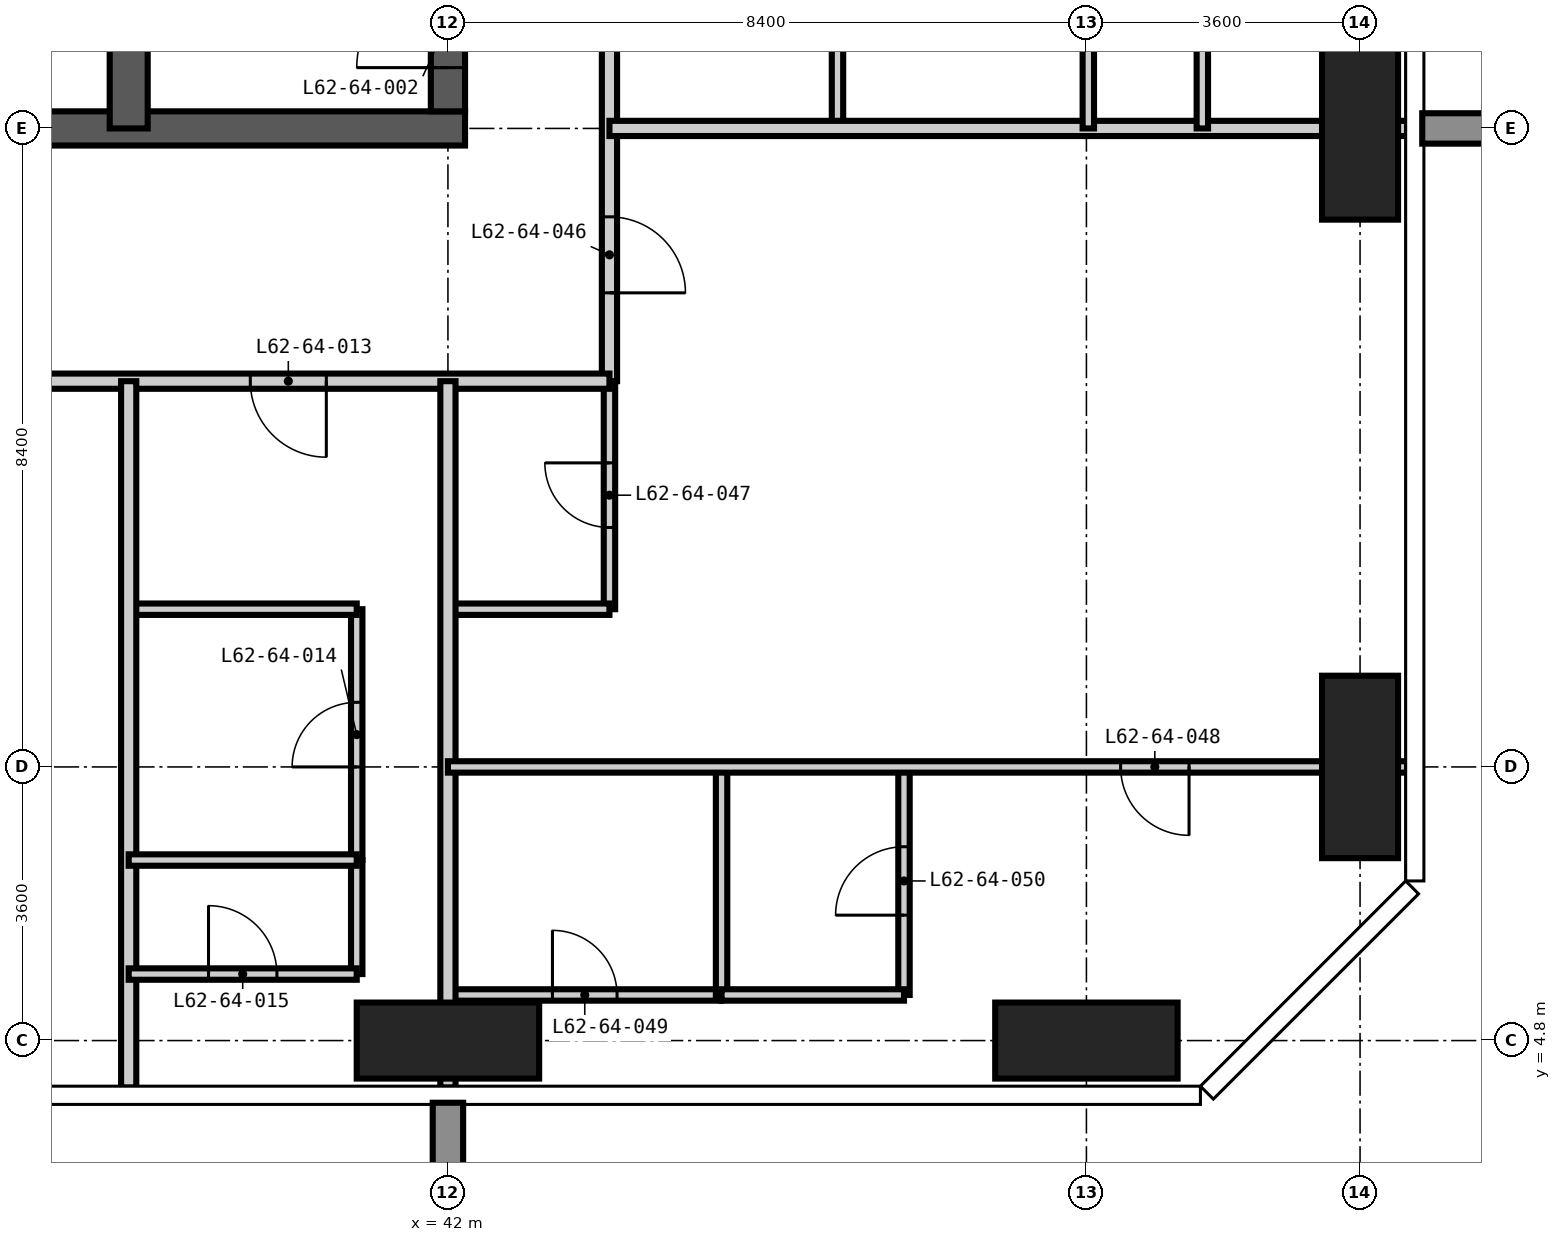
"""IFC4 building model, lengths in metres.
Left out: names, types, materials, properties, quantities, classifications, styles, units other than length and angle.
Written with IfcOpenShell. Run it as: python <this file> out.ifc"""

import sys

from ifc_helpers import new_model, si_unit, direction, frame, frame_2d, origin, origin_2d, place, context, subcontext, project, spatial, rectangle, extrude, element, fill, save


model = new_model("IFC4")
c1 = context("Model", 3, precision=1e-05, world=origin(), true_north=direction((0.0, 1.0)))
c2 = subcontext(c1, "Body", "Model", "MODEL_VIEW")
j1 = project(units=[si_unit("LENGTHUNIT", "METRE"), si_unit("PLANEANGLEUNIT", "RADIAN")], contexts=[c1])
p1 = place(None, origin())
s1 = spatial("IfcSite", under=j1, at=p1, CompositionType="ELEMENT")
p2 = place(p1, origin())
s2 = spatial("IfcBuilding", under=s1, at=p2, CompositionType="ELEMENT")
p3 = place(p2, frame((0.0, 0.0, 241.2)))
s3 = spatial("IfcBuildingStorey", under=s2, at=p3, CompositionType="ELEMENT", Elevation=241.2)
for number, where, z_axis, x_axis in (
    (1, (42.0, 4.8, -0.35), (0.0, 0.0, 1.0), (1.0, 0.0, 0.0)),
    (2, (50.4, 4.8, -0.35), (0.0, 0.0, 1.0), (1.0, 0.0, 0.0)),
):
    element("IfcColumn", number, at=place(p3, frame(where, z_axis=z_axis, x_axis=x_axis)), inside=s3, PredefinedType="COLUMN", context=c2, shape_type="SweptSolid", body=[
        extrude(rectangle(XDim=2.4, YDim=1.0, at=origin_2d()), origin(), (0.0, 0.0, 1.0), 3.9),
    ])
for number, where, z_axis, x_axis in (
    (3, (54.0, 8.4, -0.35), (0.0, 0.0, 1.0), (1.0, 0.0, 0.0)),
    (4, (54.0, 16.8, -0.35), (0.0, 0.0, 1.0), (1.0, 0.0, 0.0)),
):
    element("IfcColumn", number, at=place(p3, frame(where, z_axis=z_axis, x_axis=x_axis)), inside=s3, PredefinedType="COLUMN", context=c2, shape_type="SweptSolid", body=[
        extrude(rectangle(XDim=1.0, YDim=2.4, at=origin_2d()), origin(), (0.0, 0.0, 1.0), 3.9),
    ])
p4 = place(p3, frame((24.975, 16.8, -0.35), z_axis=(0.0, 0.0, 1.0), x_axis=(1.0, 0.0, 0.0)))
e5 = element("IfcWall", 5, at=p4, inside=s3, PredefinedType="SHEAR", context=c2, shape_type="SweptSolid", body=[
    extrude(rectangle(XDim=17.25, YDim=0.45, at=frame_2d((8.625, 0.0))), origin(), (0.0, 0.0, 1.0), 3.9),
])
p5 = place(p4, frame((3.925, 0.0, 0.35)))
e6 = element("IfcOpeningElement", 6, at=p5, cuts=e5, PredefinedType="OPENING", context=c2, shape_type="SweptSolid", body=[
    extrude(rectangle(XDim=1.0, YDim=2.1, at=frame_2d((0.5, 1.05))), frame((0.0, 0.235, 0.0), z_axis=(0.0, -1.0, 0.0), x_axis=(1.0, 0.0, 0.0)), (0.0, 0.0, 1.0), 0.47),
])
p6 = place(p4, frame((10.225, 0.0, 0.35)))
e7 = element("IfcOpeningElement", 7, at=p6, cuts=e5, PredefinedType="OPENING", context=c2, shape_type="SweptSolid", body=[
    extrude(rectangle(XDim=1.0, YDim=2.1, at=frame_2d((0.5, 1.05))), frame((0.0, 0.235, 0.0), z_axis=(0.0, -1.0, 0.0), x_axis=(1.0, 0.0, 0.0)), (0.0, 0.0, 1.0), 0.47),
])
p7 = place(p3, frame((42.0, 17.025, -0.35), z_axis=(0.0, 0.0, 1.0), x_axis=(0.0, 1.0, 0.0)))
e8 = element("IfcWall", 8, at=p7, inside=s3, PredefinedType="SHEAR", context=c2, shape_type="SweptSolid", body=[
    extrude(rectangle(XDim=24.75, YDim=0.45, at=frame_2d((12.375, 0.0))), origin(), (0.0, 0.0, 1.0), 3.9),
])
p8 = place(p7, frame((0.575, 0.0, 0.35)))
e9 = element("IfcOpeningElement", 9, at=p8, cuts=e8, PredefinedType="OPENING", context=c2, shape_type="SweptSolid", body=[
    extrude(rectangle(XDim=1.2, YDim=2.2, at=frame_2d((0.6, 1.1))), frame((0.0, 0.235, 0.0), z_axis=(0.0, -1.0, 0.0), x_axis=(1.0, 0.0, 0.0)), (0.0, 0.0, 1.0), 0.47),
])
p9 = place(p7, frame((11.475, 0.0, 0.35)))
e10 = element("IfcOpeningElement", 10, at=p9, cuts=e8, PredefinedType="OPENING", context=c2, shape_type="SweptSolid", body=[
    extrude(rectangle(XDim=1.8, YDim=2.2, at=frame_2d((0.9, 1.1))), frame((0.0, 0.235, 0.0), z_axis=(0.0, -1.0, 0.0), x_axis=(1.0, 0.0, 0.0)), (0.0, 0.0, 1.0), 0.47),
])
p10 = place(p7, frame((20.275, 0.0, 0.35)))
e11 = element("IfcOpeningElement", 11, at=p10, cuts=e8, PredefinedType="OPENING", context=c2, shape_type="SweptSolid", body=[
    extrude(rectangle(XDim=1.0, YDim=2.1, at=frame_2d((0.5, 1.05))), frame((0.0, 0.235, 0.0), z_axis=(0.0, -1.0, 0.0), x_axis=(1.0, 0.0, 0.0)), (0.0, 0.0, 1.0), 0.47),
])
p11 = place(p3, frame((37.8, 16.8, -0.35), z_axis=(0.0, 0.0, 1.0), x_axis=(0.0, 1.0, 0.0)))
e12 = element("IfcWall", 12, at=p11, inside=s3, PredefinedType="SHEAR", context=c2, shape_type="SweptSolid", body=[
    extrude(rectangle(XDim=11.2, YDim=0.5, at=frame_2d((5.6, 0.0))), origin(), (0.0, 0.0, 1.0), 3.9),
])
p12 = place(p3, frame((40.8, 7.175, 0.0), z_axis=(0.0, 0.0, 1.0), x_axis=(0.0, 1.0, 0.0)))
e13 = element("IfcWall", 13, at=p12, inside=s3, PredefinedType="PARTITIONING", context=c2, shape_type="SweptSolid", body=[
    extrude(rectangle(XDim=3.3, YDim=0.15, at=frame_2d((1.65, 0.0))), origin(), (0.0, 0.0, 1.0), 3.55),
])
p13 = place(p12, frame((1.225, 0.0, 0.0)))
e14 = element("IfcOpeningElement", 14, at=p13, cuts=e13, PredefinedType="OPENING", context=c2, shape_type="SweptSolid", body=[
    extrude(rectangle(XDim=0.85, YDim=2.1, at=frame_2d((0.425, 1.05))), frame((0.0, 0.085, 0.0), z_axis=(0.0, -1.0, 0.0), x_axis=(1.0, 0.0, 0.0)), (0.0, 0.0, 1.0), 0.17),
])
p14 = place(p3, frame((44.125, 10.475, 0.0), z_axis=(0.0, 0.0, 1.0), x_axis=(0.0, 1.0, 0.0)))
e15 = element("IfcWall", 15, at=p14, inside=s3, PredefinedType="PARTITIONING", context=c2, shape_type="SweptSolid", body=[
    extrude(rectangle(XDim=3.0, YDim=0.15, at=frame_2d((1.5, 0.0))), origin(), (0.0, 0.0, 1.0), 3.55),
])
p15 = place(p14, frame((1.075, 0.0, 0.0)))
e16 = element("IfcOpeningElement", 16, at=p15, cuts=e15, PredefinedType="OPENING", context=c2, shape_type="SweptSolid", body=[
    extrude(rectangle(XDim=0.85, YDim=2.1, at=frame_2d((0.425, 1.05))), frame((0.0, 0.085, 0.0), z_axis=(0.0, -1.0, 0.0), x_axis=(1.0, 0.0, 0.0)), (0.0, 0.0, 1.0), 0.17),
])
p16 = place(p3, frame((47.125, 16.8, 0.0), z_axis=(0.0, 0.0, 1.0), x_axis=(0.0, 1.0, 0.0)))
e17 = element("IfcWall", 17, at=p16, inside=s3, PredefinedType="PARTITIONING", context=c2, shape_type="SweptSolid", body=[
    extrude(rectangle(XDim=3.0, YDim=0.15, at=frame_2d((1.5, 0.0))), origin(), (0.0, 0.0, 1.0), 3.55),
])
p17 = place(p3, frame((42.0, 5.4, 0.0), z_axis=(0.0, 0.0, 1.0), x_axis=(1.0, 0.0, 0.0)))
e18 = element("IfcWall", 18, at=p17, inside=s3, PredefinedType="PARTITIONING", context=c2, shape_type="SweptSolid", body=[
    extrude(rectangle(XDim=3.6, YDim=0.15, at=frame_2d((1.8, 0.0))), origin(), (0.0, 0.0, 1.0), 3.55),
])
p18 = place(p17, frame((1.375, 0.0, 0.0)))
e19 = element("IfcOpeningElement", 19, at=p18, cuts=e18, PredefinedType="OPENING", context=c2, shape_type="SweptSolid", body=[
    extrude(rectangle(XDim=0.85, YDim=2.1, at=frame_2d((0.425, 1.05))), frame((0.0, 0.085, 0.0), z_axis=(0.0, -1.0, 0.0), x_axis=(1.0, 0.0, 0.0)), (0.0, 0.0, 1.0), 0.17),
])
p19 = place(p3, frame((37.8, 10.475, 0.0), z_axis=(0.0, 0.0, 1.0), x_axis=(1.0, 0.0, 0.0)))
e20 = element("IfcWall", 20, at=p19, inside=s3, PredefinedType="PARTITIONING", context=c2, shape_type="SweptSolid", body=[
    extrude(rectangle(XDim=3.0, YDim=0.15, at=frame_2d((1.5, 0.0))), origin(), (0.0, 0.0, 1.0), 3.55),
])
p20 = place(p3, frame((42.0, 10.475, 0.0), z_axis=(0.0, 0.0, 1.0), x_axis=(1.0, 0.0, 0.0)))
e21 = element("IfcWall", 21, at=p20, inside=s3, PredefinedType="PARTITIONING", context=c2, shape_type="SweptSolid", body=[
    extrude(rectangle(XDim=2.125, YDim=0.15, at=frame_2d((1.062, 0.0))), origin(), (0.0, 0.0, 1.0), 3.55),
])
p21 = place(p3, frame((44.125, 25.2, 0.0), z_axis=(0.0, 0.0, 1.0), x_axis=(0.0, -1.0, 0.0)))
e22 = element("IfcWall", 22, at=p21, inside=s3, PredefinedType="PARTITIONING", context=c2, shape_type="SweptSolid", body=[
    extrude(rectangle(XDim=11.725, YDim=0.2, at=frame_2d((5.862, 0.0))), origin(), (0.0, 0.0, 1.0), 3.55),
])
p22 = place(p21, frame((3.7, 0.0, 0.0)))
e23 = element("IfcOpeningElement", 23, at=p22, cuts=e22, PredefinedType="OPENING", context=c2, shape_type="SweptSolid", body=[
    extrude(rectangle(XDim=1.0, YDim=2.2, at=frame_2d((0.5, 1.1))), frame((0.0, 0.11, 0.0), z_axis=(0.0, -1.0, 0.0), x_axis=(1.0, 0.0, 0.0)), (0.0, 0.0, 1.0), 0.22),
])
p23 = place(p21, frame((9.563, 0.0, 0.0)))
e24 = element("IfcOpeningElement", 24, at=p23, cuts=e22, PredefinedType="OPENING", context=c2, shape_type="SweptSolid", body=[
    extrude(rectangle(XDim=1.0, YDim=2.2, at=frame_2d((0.5, 1.1))), frame((0.0, 0.11, 0.0), z_axis=(0.0, -1.0, 0.0), x_axis=(1.0, 0.0, 0.0)), (0.0, 0.0, 1.0), 0.22),
])
p24 = place(p3, frame((44.125, 13.475, 0.0), z_axis=(0.0, 0.0, 1.0), x_axis=(-1.0, 0.0, 0.0)))
e25 = element("IfcWall", 25, at=p24, inside=s3, PredefinedType="PARTITIONING", context=c2, shape_type="SweptSolid", body=[
    extrude(rectangle(XDim=22.25, YDim=0.2, at=frame_2d((11.125, 0.0))), origin(), (0.0, 0.0, 1.0), 3.55),
])
p25 = place(p24, frame((16.325, 0.0, 0.0)))
e26 = element("IfcOpeningElement", 26, at=p25, cuts=e25, PredefinedType="OPENING", context=c2, shape_type="SweptSolid", body=[
    extrude(rectangle(XDim=1.0, YDim=2.2, at=frame_2d((0.5, 1.1))), frame((0.0, 0.11, 0.0), z_axis=(0.0, -1.0, 0.0), x_axis=(1.0, 0.0, 0.0)), (0.0, 0.0, 1.0), 0.22),
])
p26 = place(p24, frame((10.025, 0.0, 0.0)))
e27 = element("IfcOpeningElement", 27, at=p26, cuts=e25, PredefinedType="OPENING", context=c2, shape_type="SweptSolid", body=[
    extrude(rectangle(XDim=1.0, YDim=2.2, at=frame_2d((0.5, 1.1))), frame((0.0, 0.11, 0.0), z_axis=(0.0, -1.0, 0.0), x_axis=(1.0, 0.0, 0.0)), (0.0, 0.0, 1.0), 0.22),
])
p27 = place(p24, frame((3.725, 0.0, 0.0)))
e28 = element("IfcOpeningElement", 28, at=p27, cuts=e25, PredefinedType="OPENING", context=c2, shape_type="SweptSolid", body=[
    extrude(rectangle(XDim=1.0, YDim=2.2, at=frame_2d((0.5, 1.1))), frame((0.0, 0.11, 0.0), z_axis=(0.0, -1.0, 0.0), x_axis=(1.0, 0.0, 0.0)), (0.0, 0.0, 1.0), 0.22),
])
for number, where, z_axis, x_axis in (
    (29, (37.8, 4.182, 0.0), (0.0, 0.0, 1.0), (0.0, 1.0, 0.0)),
    (30, (42.0, 4.182, 0.0), (0.0, 0.0, 1.0), (0.0, 1.0, 0.0)),
):
    element("IfcWall", number, at=place(p3, frame(where, z_axis=z_axis, x_axis=x_axis)), inside=s3, PredefinedType="PARTITIONING", context=c2, shape_type="SweptSolid", body=[
        extrude(rectangle(XDim=9.293, YDim=0.2, at=frame_2d((4.646, 0.0))), origin(), (0.0, 0.0, 1.0), 3.55),
    ])
p28 = place(p3, frame((44.125, 16.8, 0.0), z_axis=(0.0, 0.0, 1.0), x_axis=(1.0, 0.0, 0.0)))
e31 = element("IfcWall", 31, at=p28, inside=s3, PredefinedType="PARTITIONING", context=c2, shape_type="SweptSolid", body=[
    extrude(rectangle(XDim=10.493, YDim=0.2, at=frame_2d((5.247, 0.0))), origin(), (0.0, 0.0, 1.0), 3.55),
])
p29 = place(p3, frame((40.8, 5.675, 0.0), z_axis=(0.0, 0.0, 1.0), x_axis=(0.0, 1.0, 0.0)))
e32 = element("IfcWall", 32, at=p29, inside=s3, PredefinedType="PARTITIONING", context=c2, shape_type="SweptSolid", body=[
    extrude(rectangle(XDim=1.5, YDim=0.15, at=frame_2d((0.75, 0.0))), origin(), (0.0, 0.0, 1.0), 3.55),
])
p30 = place(p3, frame((45.6, 5.4, 0.0), z_axis=(0.0, 0.0, 1.0), x_axis=(0.0, 1.0, 0.0)))
e33 = element("IfcWall", 33, at=p30, inside=s3, PredefinedType="PARTITIONING", context=c2, shape_type="SweptSolid", body=[
    extrude(rectangle(XDim=3.0, YDim=0.15, at=frame_2d((1.5, 0.0))), origin(), (0.0, 0.0, 1.0), 3.55),
])
p31 = place(p3, frame((48.0, 5.4, 0.0), z_axis=(0.0, 0.0, 1.0), x_axis=(0.0, 1.0, 0.0)))
e34 = element("IfcWall", 34, at=p31, inside=s3, PredefinedType="PARTITIONING", context=c2, shape_type="SweptSolid", body=[
    extrude(rectangle(XDim=3.0, YDim=0.15, at=frame_2d((1.5, 0.0))), origin(), (0.0, 0.0, 1.0), 3.55),
])
p32 = place(p31, frame((1.05, 0.0, 0.0)))
e35 = element("IfcOpeningElement", 35, at=p32, cuts=e34, PredefinedType="OPENING", context=c2, shape_type="SweptSolid", body=[
    extrude(rectangle(XDim=0.9, YDim=2.1, at=frame_2d((0.45, 1.05))), frame((0.0, 0.085, 0.0), z_axis=(0.0, -1.0, 0.0), x_axis=(1.0, 0.0, 0.0)), (0.0, 0.0, 1.0), 0.17),
])
p33 = place(p3, frame((50.425, 16.8, 0.0), z_axis=(0.0, 0.0, 1.0), x_axis=(0.0, 1.0, 0.0)))
e36 = element("IfcWall", 36, at=p33, inside=s3, PredefinedType="PARTITIONING", context=c2, shape_type="SweptSolid", body=[
    extrude(rectangle(XDim=3.0, YDim=0.15, at=frame_2d((1.5, 0.0))), origin(), (0.0, 0.0, 1.0), 3.55),
])
p34 = place(p3, frame((51.925, 16.8, 0.0), z_axis=(0.0, 0.0, 1.0), x_axis=(0.0, 1.0, 0.0)))
e37 = element("IfcWall", 37, at=p34, inside=s3, PredefinedType="PARTITIONING", context=c2, shape_type="SweptSolid", body=[
    extrude(rectangle(XDim=3.0, YDim=0.15, at=frame_2d((1.5, 0.0))), origin(), (0.0, 0.0, 1.0), 3.55),
])
p35 = place(p34, frame((1.25, 0.0, 0.0)))
e38 = element("IfcOpeningElement", 38, at=p35, cuts=e37, PredefinedType="OPENING", context=c2, shape_type="SweptSolid", body=[
    extrude(rectangle(XDim=0.9, YDim=2.1, at=frame_2d((0.45, 1.05))), frame((0.0, 0.085, 0.0), z_axis=(0.0, -1.0, 0.0), x_axis=(1.0, 0.0, 0.0)), (0.0, 0.0, 1.0), 0.17),
])
p36 = place(p3, frame((45.6, 5.4, 0.0), z_axis=(0.0, 0.0, 1.0), x_axis=(1.0, 0.0, 0.0)))
e39 = element("IfcWall", 39, at=p36, inside=s3, PredefinedType="PARTITIONING", context=c2, shape_type="SweptSolid", body=[
    extrude(rectangle(XDim=2.4, YDim=0.15, at=frame_2d((1.2, 0.0))), origin(), (0.0, 0.0, 1.0), 3.55),
])
p37 = place(p3, frame((37.8, 5.675, 0.0), z_axis=(0.0, 0.0, 1.0), x_axis=(1.0, 0.0, 0.0)))
e40 = element("IfcWall", 40, at=p37, inside=s3, PredefinedType="PARTITIONING", context=c2, shape_type="SweptSolid", body=[
    extrude(rectangle(XDim=3.0, YDim=0.15, at=frame_2d((1.5, 0.0))), origin(), (0.0, 0.0, 1.0), 3.55),
])
p38 = place(p37, frame((1.05, 0.0, 0.0)))
e41 = element("IfcOpeningElement", 41, at=p38, cuts=e40, PredefinedType="OPENING", context=c2, shape_type="SweptSolid", body=[
    extrude(rectangle(XDim=0.9, YDim=2.1, at=frame_2d((0.45, 1.05))), frame((0.0, 0.085, 0.0), z_axis=(0.0, -1.0, 0.0), x_axis=(1.0, 0.0, 0.0)), (0.0, 0.0, 1.0), 0.17),
])
p39 = place(p3, frame((37.8, 7.175, 0.0), z_axis=(0.0, 0.0, 1.0), x_axis=(1.0, 0.0, 0.0)))
e42 = element("IfcWall", 42, at=p39, inside=s3, PredefinedType="PARTITIONING", context=c2, shape_type="SweptSolid", body=[
    extrude(rectangle(XDim=3.0, YDim=0.15, at=frame_2d((1.5, 0.0))), origin(), (0.0, 0.0, 1.0), 3.55),
])
p40 = place(p3, frame((42.0, 8.4, 0.0), z_axis=(0.0, 0.0, 1.0), x_axis=(1.0, 0.0, 0.0)))
e43 = element("IfcWall", 43, at=p40, inside=s3, PredefinedType="PARTITIONING", context=c2, shape_type="SweptSolid", body=[
    extrude(rectangle(XDim=12.618, YDim=0.15, at=frame_2d((6.309, 0.0))), origin(), (0.0, 0.0, 1.0), 3.55),
])
p41 = place(p40, frame((8.85, 0.0, 0.0)))
e44 = element("IfcOpeningElement", 44, at=p41, cuts=e43, PredefinedType="OPENING", context=c2, shape_type="SweptSolid", body=[
    extrude(rectangle(XDim=0.9, YDim=2.1, at=frame_2d((0.45, 1.05))), frame((0.0, 0.085, 0.0), z_axis=(0.0, -1.0, 0.0), x_axis=(1.0, 0.0, 0.0)), (0.0, 0.0, 1.0), 0.17),
])
p42 = place(p8, origin())
e45 = element("IfcDoor", 45, at=p42, inside=s3, OperationType="SINGLE_SWING_LEFT", PredefinedType="DOOR", context=c2, shape_type="SweptSolid", body=[
    extrude(rectangle(XDim=1.2, YDim=2.2, at=frame_2d((0.6, 1.1))), frame((0.0, 0.025, 0.0), z_axis=(0.0, -1.0, 0.0), x_axis=(1.0, 0.0, 0.0)), (0.0, 0.0, 1.0), 0.05),
])
fill(e9, e45)
p43 = place(p27, origin())
e46 = element("IfcDoor", 46, at=p43, inside=s3, OperationType="SINGLE_SWING_LEFT", PredefinedType="DOOR", context=c2, shape_type="SweptSolid", body=[
    extrude(rectangle(XDim=1.0, YDim=2.2, at=frame_2d((0.5, 1.1))), frame((0.0, 0.025, 0.0), z_axis=(0.0, -1.0, 0.0), x_axis=(1.0, 0.0, 0.0)), (0.0, 0.0, 1.0), 0.05),
])
fill(e28, e46)
p44 = place(p13, origin())
e47 = element("IfcDoor", 47, at=p44, inside=s3, OperationType="SINGLE_SWING_LEFT", PredefinedType="DOOR", context=c2, shape_type="SweptSolid", body=[
    extrude(rectangle(XDim=0.85, YDim=2.1, at=frame_2d((0.425, 1.05))), frame((0.0, 0.025, 0.0), z_axis=(0.0, -1.0, 0.0), x_axis=(1.0, 0.0, 0.0)), (0.0, 0.0, 1.0), 0.05),
])
fill(e14, e47)
p45 = place(p38, origin())
e48 = element("IfcDoor", 48, at=p45, inside=s3, OperationType="SINGLE_SWING_LEFT", PredefinedType="DOOR", context=c2, shape_type="SweptSolid", body=[
    extrude(rectangle(XDim=0.9, YDim=2.1, at=frame_2d((0.45, 1.05))), frame((0.0, 0.025, 0.0), z_axis=(0.0, -1.0, 0.0), x_axis=(1.0, 0.0, 0.0)), (0.0, 0.0, 1.0), 0.05),
])
fill(e41, e48)
p46 = place(p23, origin())
e49 = element("IfcDoor", 49, at=p46, inside=s3, OperationType="SINGLE_SWING_RIGHT", PredefinedType="DOOR", context=c2, shape_type="SweptSolid", body=[
    extrude(rectangle(XDim=1.0, YDim=2.2, at=frame_2d((0.5, 1.1))), frame((0.0, 0.025, 0.0), z_axis=(0.0, -1.0, 0.0), x_axis=(1.0, 0.0, 0.0)), (0.0, 0.0, 1.0), 0.05),
])
fill(e24, e49)
p47 = place(p15, origin())
e50 = element("IfcDoor", 50, at=p47, inside=s3, OperationType="SINGLE_SWING_RIGHT", PredefinedType="DOOR", context=c2, shape_type="SweptSolid", body=[
    extrude(rectangle(XDim=0.85, YDim=2.1, at=frame_2d((0.425, 1.05))), frame((0.0, 0.025, 0.0), z_axis=(0.0, -1.0, 0.0), x_axis=(1.0, 0.0, 0.0)), (0.0, 0.0, 1.0), 0.05),
])
fill(e16, e50)
p48 = place(p41, frame((0.9, 0.0, 0.0), z_axis=(0.0, 0.0, 1.0), x_axis=(-1.0, 0.0, 0.0)))
e51 = element("IfcDoor", 51, at=p48, inside=s3, OperationType="SINGLE_SWING_LEFT", PredefinedType="DOOR", context=c2, shape_type="SweptSolid", body=[
    extrude(rectangle(XDim=0.9, YDim=2.1, at=frame_2d((0.45, 1.05))), frame((0.0, 0.025, 0.0), z_axis=(0.0, -1.0, 0.0), x_axis=(1.0, 0.0, 0.0)), (0.0, 0.0, 1.0), 0.05),
])
fill(e44, e51)
p49 = place(p18, origin())
e52 = element("IfcDoor", 52, at=p49, inside=s3, OperationType="SINGLE_SWING_LEFT", PredefinedType="DOOR", context=c2, shape_type="SweptSolid", body=[
    extrude(rectangle(XDim=0.85, YDim=2.1, at=frame_2d((0.425, 1.05))), frame((0.0, 0.025, 0.0), z_axis=(0.0, -1.0, 0.0), x_axis=(1.0, 0.0, 0.0)), (0.0, 0.0, 1.0), 0.05),
])
fill(e19, e52)
p50 = place(p32, origin())
e53 = element("IfcDoor", 53, at=p50, inside=s3, OperationType="SINGLE_SWING_LEFT", PredefinedType="DOOR", context=c2, shape_type="SweptSolid", body=[
    extrude(rectangle(XDim=0.9, YDim=2.1, at=frame_2d((0.45, 1.05))), frame((0.0, 0.025, 0.0), z_axis=(0.0, -1.0, 0.0), x_axis=(1.0, 0.0, 0.0)), (0.0, 0.0, 1.0), 0.05),
])
fill(e35, e53)
save(model, sys.argv[1])
